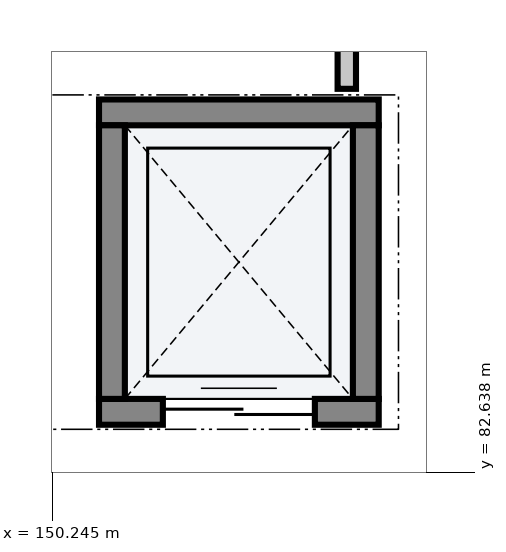
"""IFC4 building model, lengths in metres.
Left out: names, types, materials, properties, quantities, classifications, styles, units other than length and angle.
Written with IfcOpenShell. Run it as: python <this file> out.ifc"""

import sys

from ifc_helpers import new_model, si_unit, direction, frame, frame_2d, origin, place, context, subcontext, project, spatial, rectangle, extrude, element, fill, save


model = new_model("IFC4")
c1 = context("Model", 3, precision=1e-05, world=origin(), true_north=direction((0.0, 1.0)))
c2 = subcontext(c1, "Body", "Model", "MODEL_VIEW")
j1 = project(units=[si_unit("LENGTHUNIT", "METRE"), si_unit("PLANEANGLEUNIT", "RADIAN")], contexts=[c1])
p1 = place(None, origin())
s1 = spatial("IfcSite", under=j1, at=p1, CompositionType="ELEMENT")
p2 = place(p1, origin())
s2 = spatial("IfcBuilding", under=s1, at=p2, CompositionType="ELEMENT")
p3 = place(p2, frame((0.0, 0.0, 15.0)))
s3 = spatial("IfcBuildingStorey", under=s2, at=p3, CompositionType="ELEMENT", Elevation=15.0)
p4 = place(p3, frame((150.86, 83.43, 0.0), z_axis=(0.0, 0.0, 1.0), x_axis=(1.0, 0.0, 0.0)))
e1 = element("IfcWall", 1, at=p4, inside=s3, PredefinedType="SHEAR", context=c2, shape_type="SweptSolid", body=[
    extrude(rectangle(XDim=3.68, YDim=0.34, at=frame_2d((1.84, 0.0))), origin(), (0.0, 0.0, 1.0), 4.52),
])
p5 = place(p4, frame((0.84, 0.0, 0.0)))
e2 = element("IfcOpeningElement", 2, at=p5, cuts=e1, PredefinedType="OPENING", context=c2, shape_type="SweptSolid", body=[
    extrude(rectangle(XDim=2.0, YDim=2.4, at=frame_2d((1.0, 1.2))), frame((0.0, 0.182, 0.0), z_axis=(0.0, -1.0, 0.0), x_axis=(1.0, 0.0, 0.0)), (0.0, 0.0, 1.0), 0.364),
])
p6 = place(p3, frame((150.86, 87.37, 0.0), z_axis=(0.0, 0.0, 1.0), x_axis=(1.0, 0.0, 0.0)))
e3 = element("IfcWall", 3, at=p6, inside=s3, PredefinedType="SHEAR", context=c2, shape_type="SweptSolid", body=[
    extrude(rectangle(XDim=3.68, YDim=0.34, at=frame_2d((1.84, 0.0))), origin(), (0.0, 0.0, 1.0), 4.52),
])
for number, where, z_axis, x_axis in (
    (4, (151.03, 83.6, 0.0), (0.0, 0.0, 1.0), (0.0, 1.0, 0.0)),
    (5, (154.37, 83.6, 0.0), (0.0, 0.0, 1.0), (0.0, 1.0, 0.0)),
):
    element("IfcWall", number, at=place(p3, frame(where, z_axis=z_axis, x_axis=x_axis)), inside=s3, PredefinedType="SHEAR", context=c2, shape_type="SweptSolid", body=[
        extrude(rectangle(XDim=3.6, YDim=0.34, at=frame_2d((1.8, 0.0))), origin(), (0.0, 0.0, 1.0), 4.52),
    ])
p7 = place(p3, frame((154.12, 87.68, 0.0), z_axis=(0.0, 0.0, 1.0), x_axis=(0.0, 1.0, 0.0)))
e6 = element("IfcWall", 6, at=p7, inside=s3, PredefinedType="PARTITIONING", context=c2, shape_type="SweptSolid", body=[
    extrude(rectangle(XDim=10.87, YDim=0.242, at=frame_2d((5.435, 0.0))), origin(), (0.0, 0.0, 1.0), 3.46),
])
p8 = place(p7, frame((3.8, 0.0, 0.0)))
e7 = element("IfcOpeningElement", 7, at=p8, cuts=e6, PredefinedType="OPENING", context=c2, shape_type="SweptSolid", body=[
    extrude(rectangle(XDim=2.2, YDim=2.5, at=frame_2d((1.1, 1.25))), frame((0.0, 0.133, 0.0), z_axis=(0.0, -1.0, 0.0), x_axis=(1.0, 0.0, 0.0)), (0.0, 0.0, 1.0), 0.266),
])
p9 = place(p5, origin())
e8 = element("IfcDoor", 8, at=p9, inside=s3, OperationType="DOUBLE_DOOR_SLIDING", PredefinedType="DOOR", context=c2, shape_type="SweptSolid", body=[
    extrude(rectangle(XDim=2.0, YDim=2.4, at=frame_2d((1.0, 1.2))), frame((0.0, 0.025, 0.0), z_axis=(0.0, -1.0, 0.0), x_axis=(1.0, 0.0, 0.0)), (0.0, 0.0, 1.0), 0.05),
])
fill(e2, e8)
save(model, sys.argv[1])
